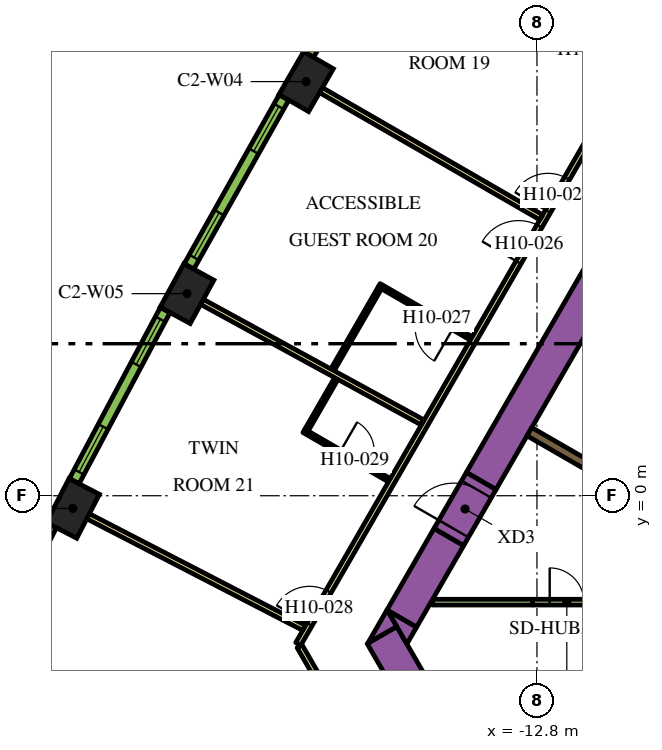
"""IFC4 building model, lengths in metres.
Left out: names, types, materials, properties, quantities, classifications, styles, units other than length and angle.
Written with IfcOpenShell. Run it as: python <this file> out.ifc"""

import sys

from ifc_helpers import new_model, si_unit, direction, frame, frame_2d, origin, origin_2d, place, context, subcontext, project, spatial, polyline, rectangle, outline, extrude, element, fill, save


model = new_model("IFC4")
c1 = context("Model", 3, precision=1e-05, world=origin(), true_north=direction((0.0, 1.0)))
c2 = subcontext(c1, "Body", "Model", "MODEL_VIEW")
j1 = project(units=[si_unit("LENGTHUNIT", "METRE"), si_unit("PLANEANGLEUNIT", "RADIAN")], contexts=[c1])
p1 = place(None, origin())
s1 = spatial("IfcSite", under=j1, at=p1, CompositionType="ELEMENT")
p2 = place(p1, origin())
s2 = spatial("IfcBuilding", under=s1, at=p2, CompositionType="ELEMENT")
p3 = place(p2, frame((0.0, 0.0, 130.5)))
s3 = spatial("IfcBuildingStorey", under=s2, at=p3, CompositionType="ELEMENT", Elevation=130.5)
for number, where, z_axis, x_axis in (
    (1, (-18.874, 10.897, 0.0), (0.0, 0.0, 1.0), (-0.5, -0.866, 0.0)),
    (2, (-22.009, 5.317, 0.0), (0.0, 0.0, 1.0), (-0.48, -0.877, 0.0)),
    (3, (-25.012, -0.334, 0.0), (0.0, 0.0, 1.0), (-0.459, -0.888, 0.0)),
):
    element("IfcColumn", number, at=place(p3, frame(where, z_axis=z_axis, x_axis=x_axis)), inside=s3, PredefinedType="COLUMN", context=c2, shape_type="SweptSolid", body=[
        extrude(rectangle(XDim=1.3, YDim=0.9, at=origin_2d()), origin(), (0.0, 0.0, 1.0), 3.9),
    ])
p4 = place(p3, frame((-14.268, 0.387, 0.0), z_axis=(0.0, 0.0, 1.0), x_axis=(0.499994617707, 0.866028511231, 0.0)))
e4 = element("IfcWall", 4, at=p4, inside=s3, PredefinedType="SOLIDWALL", context=c2, shape_type="SweptSolid", body=[
    extrude(rectangle(XDim=18.817, YDim=0.9, at=frame_2d((9.409, 0.0))), origin(), (0.0, 0.0, 1.0), 3.9),
])
p5 = place(p3, frame((-12.134, -11.883, 0.0), z_axis=(0.0, 0.0, 1.0), x_axis=(-0.500005339912, 0.866022320763, 0.0)))
e5 = element("IfcWall", 5, at=p5, inside=s3, PredefinedType="SOLIDWALL", context=c2, shape_type="SweptSolid", body=[
    extrude(rectangle(XDim=9.488, YDim=0.9, at=frame_2d((4.744, 0.0))), origin(), (0.0, 0.0, 1.0), 3.9),
])
p6 = place(p3, origin())
e6 = element("IfcWall", 6, at=p6, inside=s3, PredefinedType="SOLIDWALL", context=c2, shape_type="SweptSolid", body=[
    extrude(outline(polyline([(-16.489, -3.44), (-17.251, -3.88), (-16.743, -3.0), (-16.489, -3.44)])), origin(), (0.0, 0.0, 1.0), 3.9),
])
p7 = place(p3, frame((-15.118, -1.085, 0.0), z_axis=(0.0, 0.0, 1.0), x_axis=(-0.50006606081, -0.865987260198, 0.0)))
e7 = element("IfcWall", 7, at=p7, inside=s3, PredefinedType="SOLIDWALL", context=c2, shape_type="SweptSolid", body=[
    extrude(rectangle(XDim=2.481, YDim=0.9, at=frame_2d((1.24, 0.0))), origin(), (0.0, 0.0, 1.0), 3.9),
])
e8 = element("IfcWall", 8, at=p6, inside=s3, PredefinedType="SOLIDWALL", context=c2, shape_type="SweptSolid", body=[
    extrude(outline(polyline([(-16.223, -3.9), (-16.732, -3.02), (-15.969, -3.46), (-16.223, -3.9)])), origin(), (0.0, 0.0, 1.0), 3.9),
])
p8 = place(p3, frame((-14.44, -6.49, 0.0), z_axis=(0.0, 0.0, 1.0), x_axis=(0.866022966069, 0.500004222222, 0.0)))
e9 = element("IfcWall", 9, at=p8, inside=s3, PredefinedType="SOLIDWALL", context=c2, shape_type="SweptSolid", body=[
    extrude(rectangle(XDim=6.8, YDim=0.25, at=frame_2d((3.4, 0.0))), origin(), (0.0, 0.0, 1.0), 3.9),
])
p9 = place(p3, frame((-12.999, 1.685, 0.0), z_axis=(0.0, 0.0, 1.0), x_axis=(0.865996765544, -0.500049599607, 0.0)))
e10 = element("IfcWall", 10, at=p9, inside=s3, PredefinedType="SOLIDWALL", context=c2, shape_type="SweptSolid", body=[
    extrude(rectangle(XDim=2.498, YDim=0.25, at=frame_2d((1.249, 0.0))), origin(), (0.0, 0.0, 1.0), 3.9),
])
p10 = place(p3, frame((-12.915, -2.8, 0.0), z_axis=(0.0, 0.0, 1.0), x_axis=(-1.0, 0.0, 0.0)))
e11 = element("IfcWall", 11, at=p10, inside=s3, PredefinedType="PARTITIONING", context=c2, shape_type="SweptSolid", body=[
    extrude(rectangle(XDim=2.637, YDim=0.15, at=frame_2d((1.318, 0.0))), origin(), (0.0, 0.0, 1.0), 2.6),
])
p11 = place(p3, frame((-15.118, -1.085, 0.0), z_axis=(0.0, 0.0, 1.0), x_axis=(0.500000056704, 0.866025371046, 0.0)))
e12 = element("IfcWall", 12, at=p11, inside=s3, PredefinedType="SOLIDWALL", context=c2, shape_type="SweptSolid", body=[
    extrude(rectangle(XDim=1.7, YDim=0.9, at=frame_2d((0.85, 0.0))), origin(), (0.0, 0.0, 1.0), 3.9),
])
p12 = place(p11, frame((0.25, 0.0, 0.0)))
e13 = element("IfcOpeningElement", 13, at=p12, cuts=e12, PredefinedType="OPENING", context=c2, shape_type="SweptSolid", body=[
    extrude(rectangle(XDim=1.2, YDim=2.1, at=frame_2d((0.6, 1.05))), frame((0.0, 0.46, 0.0), z_axis=(0.0, -1.0, 0.0), x_axis=(1.0, 0.0, 0.0)), (0.0, 0.0, 1.0), 0.92),
])
p13 = place(p3, frame((-12.915, -2.8, 0.0), z_axis=(0.0, 0.0, 1.0), x_axis=(1.0, 0.0, 0.0)))
e14 = element("IfcWall", 14, at=p13, inside=s3, PredefinedType="PARTITIONING", context=c2, shape_type="SweptSolid", body=[
    extrude(rectangle(XDim=1.8, YDim=0.15, at=frame_2d((0.9, 0.0))), origin(), (0.0, 0.0, 1.0), 2.6),
])
p14 = place(p13, frame((0.45, 0.0, 0.0)))
e15 = element("IfcOpeningElement", 15, at=p14, cuts=e14, PredefinedType="OPENING", context=c2, shape_type="SweptSolid", body=[
    extrude(rectangle(XDim=0.9, YDim=2.1, at=frame_2d((0.45, 1.05))), frame((0.0, 0.085, 0.0), z_axis=(0.0, -1.0, 0.0), x_axis=(1.0, 0.0, 0.0)), (0.0, 0.0, 1.0), 0.17),
])
p15 = place(p3, frame((-19.081, -3.9, 0.0), z_axis=(0.0, 0.0, 1.0), x_axis=(0.499998313975, 0.866026377209, 0.0)))
e16 = element("IfcWall", 16, at=p15, inside=s3, PredefinedType="PARTITIONING", context=c2, shape_type="SweptSolid", body=[
    extrude(rectangle(XDim=25.766, YDim=0.15, at=frame_2d((12.883, 0.0))), origin(), (0.0, 0.0, 1.0), 2.6),
])
p16 = place(p15, frame((24.141, 0.0, 0.0)))
e17 = element("IfcOpeningElement", 17, at=p16, cuts=e16, PredefinedType="OPENING", context=c2, shape_type="SweptSolid", body=[
    extrude(rectangle(XDim=1.1, YDim=2.1, at=frame_2d((0.55, 1.05))), frame((0.0, 0.085, 0.0), z_axis=(0.0, -1.0, 0.0), x_axis=(1.0, 0.0, 0.0)), (0.0, 0.0, 1.0), 0.17),
])
p17 = place(p15, frame((13.144, 0.0, 0.0)))
e18 = element("IfcOpeningElement", 18, at=p17, cuts=e16, PredefinedType="OPENING", context=c2, shape_type="SweptSolid", body=[
    extrude(rectangle(XDim=1.0, YDim=2.1, at=frame_2d((0.5, 1.05))), frame((0.0, 0.085, 0.0), z_axis=(0.0, -1.0, 0.0), x_axis=(1.0, 0.0, 0.0)), (0.0, 0.0, 1.0), 0.17),
])
p18 = place(p15, frame((11.593, 0.0, 0.0)))
e19 = element("IfcOpeningElement", 19, at=p18, cuts=e16, PredefinedType="OPENING", context=c2, shape_type="SweptSolid", body=[
    extrude(rectangle(XDim=1.1, YDim=2.1, at=frame_2d((0.55, 1.05))), frame((0.0, 0.085, 0.0), z_axis=(0.0, -1.0, 0.0), x_axis=(1.0, 0.0, 0.0)), (0.0, 0.0, 1.0), 0.17),
])
p19 = place(p15, frame((0.596, 0.0, 0.0)))
e20 = element("IfcOpeningElement", 20, at=p19, cuts=e16, PredefinedType="OPENING", context=c2, shape_type="SweptSolid", body=[
    extrude(rectangle(XDim=1.0, YDim=2.1, at=frame_2d((0.5, 1.05))), frame((0.0, 0.085, 0.0), z_axis=(0.0, -1.0, 0.0), x_axis=(1.0, 0.0, 0.0)), (0.0, 0.0, 1.0), 0.17),
])
p20 = place(p3, frame((-16.412, -8.523, 0.0), z_axis=(0.0, 0.0, 1.0), x_axis=(-0.500001929737, 0.866024289647, 0.0)))
e21 = element("IfcWall", 21, at=p20, inside=s3, PredefinedType="PARTITIONING", context=c2, shape_type="SweptSolid", body=[
    extrude(rectangle(XDim=5.268, YDim=0.15, at=frame_2d((2.634, 0.0))), origin(), (0.0, 0.0, 1.0), 2.6),
])
p21 = place(p20, frame((2.157, 0.0, 0.0)))
e22 = element("IfcOpeningElement", 22, at=p21, cuts=e21, PredefinedType="OPENING", context=c2, shape_type="SweptSolid", body=[
    extrude(rectangle(XDim=1.0, YDim=2.1, at=frame_2d((0.5, 1.05))), frame((0.0, 0.085, 0.0), z_axis=(0.0, -1.0, 0.0), x_axis=(1.0, 0.0, 0.0)), (0.0, 0.0, 1.0), 0.17),
])
p22 = place(p3, frame((-24.613, -0.541, 0.0), z_axis=(0.0, 0.0, 1.0), x_axis=(0.888459912519, -0.458954228487, 0.0)))
e23 = element("IfcWall", 23, at=p22, inside=s3, PredefinedType="PARTITIONING", context=c2, shape_type="SweptSolid", body=[
    extrude(rectangle(XDim=6.392, YDim=0.15, at=frame_2d((3.196, 0.0))), origin(), (0.0, 0.0, 1.0), 2.6),
])
p23 = place(p3, frame((-21.614, 5.102, 0.0), z_axis=(0.0, 0.0, 1.0), x_axis=(0.877484555087, -0.479604895287, 0.0)))
e24 = element("IfcWall", 24, at=p23, inside=s3, PredefinedType="PARTITIONING", context=c2, shape_type="SweptSolid", body=[
    extrude(rectangle(XDim=6.611, YDim=0.15, at=frame_2d((3.306, 0.0))), origin(), (0.0, 0.0, 1.0), 2.6),
])
p24 = place(p3, frame((-18.484, 10.672, 0.0), z_axis=(0.0, 0.0, 1.0), x_axis=(0.866019162053, -0.50001081084, 0.0)))
e25 = element("IfcWall", 25, at=p24, inside=s3, PredefinedType="PARTITIONING", context=c2, shape_type="SweptSolid", body=[
    extrude(rectangle(XDim=6.694, YDim=0.15, at=frame_2d((3.347, 0.0))), origin(), (0.0, 0.0, 1.0), 2.6),
])
p25 = place(p3, frame((-12.698, 12.506, 0.0), z_axis=(0.0, 0.0, 1.0), x_axis=(0.865997922154, -0.500047596559, 0.0)))
e26 = element("IfcWall", 26, at=p25, inside=s3, PredefinedType="PARTITIONING", context=c2, shape_type="SweptSolid", body=[
    extrude(rectangle(XDim=2.6, YDim=0.1, at=frame_2d((1.3, 0.0))), origin(), (0.0, 0.0, 1.0), 2.6),
])
p26 = place(p25, frame((1.1, 0.0, 0.0)))
e27 = element("IfcOpeningElement", 27, at=p26, cuts=e26, PredefinedType="OPENING", context=c2, shape_type="SweptSolid", body=[
    extrude(rectangle(XDim=0.9, YDim=2.1, at=frame_2d((0.45, 1.05))), frame((0.0, 0.06, 0.0), z_axis=(0.0, -1.0, 0.0), x_axis=(1.0, 0.0, 0.0)), (0.0, 0.0, 1.0), 0.12),
])
p27 = place(p3, frame((-14.527, 4.138, 0.0), z_axis=(0.0, 0.0, 1.0), x_axis=(-0.866018616679, 0.500011755427, 0.0)))
e28 = element("IfcWall", 28, at=p27, inside=s3, PredefinedType="PARTITIONING", context=c2, shape_type="SweptSolid", body=[
    extrude(rectangle(XDim=2.8, YDim=0.1, at=frame_2d((1.4, 0.0))), origin(), (0.0, 0.0, 1.0), 2.6),
])
p28 = place(p27, frame((0.55, 0.0, 0.0)))
e29 = element("IfcOpeningElement", 29, at=p28, cuts=e28, PredefinedType="OPENING", context=c2, shape_type="SweptSolid", body=[
    extrude(rectangle(XDim=1.0, YDim=2.1, at=frame_2d((0.5, 1.05))), frame((0.0, 0.06, 0.0), z_axis=(0.0, -1.0, 0.0), x_axis=(1.0, 0.0, 0.0)), (0.0, 0.0, 1.0), 0.12),
])
p29 = place(p3, frame((-16.934, 5.469, 0.0), z_axis=(0.0, 0.0, 1.0), x_axis=(-0.499945955465, -0.866056604163, 0.0)))
e30 = element("IfcWall", 30, at=p29, inside=s3, PredefinedType="PARTITIONING", context=c2, shape_type="SweptSolid", body=[
    extrude(rectangle(XDim=2.49, YDim=0.1, at=frame_2d((1.245, 0.0))), origin(), (0.0, 0.0, 1.0), 2.6),
])
p30 = place(p3, frame((-18.933, 1.707, 0.0), z_axis=(0.0, 0.0, 1.0), x_axis=(0.866021400173, -0.500006934395, 0.0)))
e31 = element("IfcWall", 31, at=p30, inside=s3, PredefinedType="PARTITIONING", context=c2, shape_type="SweptSolid", body=[
    extrude(rectangle(XDim=2.6, YDim=0.1, at=frame_2d((1.3, 0.0))), origin(), (0.0, 0.0, 1.0), 2.6),
])
p31 = place(p30, frame((1.1, 0.0, 0.0)))
e32 = element("IfcOpeningElement", 32, at=p31, cuts=e31, PredefinedType="OPENING", context=c2, shape_type="SweptSolid", body=[
    extrude(rectangle(XDim=0.9, YDim=2.1, at=frame_2d((0.45, 1.05))), frame((0.0, 0.06, 0.0), z_axis=(0.0, -1.0, 0.0), x_axis=(1.0, 0.0, 0.0)), (0.0, 0.0, 1.0), 0.12),
])
p32 = place(p3, frame((-18.865, 1.725, 0.0), z_axis=(0.0, 0.0, 1.0), x_axis=(0.499993381564, 0.866029224906, 0.0)))
e33 = element("IfcWall", 33, at=p32, inside=s3, PredefinedType="PARTITIONING", context=c2, shape_type="SweptSolid", body=[
    extrude(rectangle(XDim=1.56, YDim=0.1, at=frame_2d((0.78, 0.0))), origin(), (0.0, 0.0, 1.0), 2.6),
])
p33 = place(p3, frame((-16.203, 15.998, 0.0), z_axis=(0.0, 0.0, 1.0), x_axis=(-0.510054281659, -0.860142214847, 0.0)))
e34 = element("IfcWall", 34, at=p33, inside=s3, PredefinedType="SOLIDWALL", context=c2, shape_type="SweptSolid", body=[
    extrude(rectangle(XDim=5.101, YDim=0.29, at=frame_2d((2.55, 0.0))), origin(), (0.0, 0.0, 1.0), 3.5),
])
p34 = place(p33, frame((0.273, 0.0, 0.9)))
e35 = element("IfcOpeningElement", 35, at=p34, cuts=e34, PredefinedType="OPENING", context=c2, shape_type="SweptSolid", body=[
    extrude(rectangle(XDim=1.35, YDim=2.15, at=frame_2d((0.675, 1.075))), frame((0.0, 0.155, 0.0), z_axis=(0.0, -1.0, 0.0), x_axis=(1.0, 0.0, 0.0)), (0.0, 0.0, 1.0), 0.31),
])
p35 = place(p33, frame((3.478, 0.0, 0.9)))
e36 = element("IfcOpeningElement", 36, at=p35, cuts=e34, PredefinedType="OPENING", context=c2, shape_type="SweptSolid", body=[
    extrude(rectangle(XDim=1.35, YDim=2.15, at=frame_2d((0.675, 1.075))), frame((0.0, 0.155, 0.0), z_axis=(0.0, -1.0, 0.0), x_axis=(1.0, 0.0, 0.0)), (0.0, 0.0, 1.0), 0.31),
])
p36 = place(p3, frame((-19.458, 10.48, 0.0), z_axis=(0.0, 0.0, 1.0), x_axis=(-0.48983164787, -0.87181704316, 0.0)))
e37 = element("IfcWall", 37, at=p36, inside=s3, PredefinedType="SOLIDWALL", context=c2, shape_type="SweptSolid", body=[
    extrude(rectangle(XDim=5.1, YDim=0.29, at=frame_2d((2.55, 0.0))), origin(), (0.0, 0.0, 1.0), 3.5),
])
p37 = place(p36, frame((0.272, 0.0, 0.9)))
e38 = element("IfcOpeningElement", 38, at=p37, cuts=e37, PredefinedType="OPENING", context=c2, shape_type="SweptSolid", body=[
    extrude(rectangle(XDim=1.35, YDim=2.15, at=frame_2d((0.675, 1.075))), frame((0.0, 0.155, 0.0), z_axis=(0.0, -1.0, 0.0), x_axis=(1.0, 0.0, 0.0)), (0.0, 0.0, 1.0), 0.31),
])
p38 = place(p36, frame((3.478, 0.0, 0.9)))
e39 = element("IfcOpeningElement", 39, at=p38, cuts=e37, PredefinedType="OPENING", context=c2, shape_type="SweptSolid", body=[
    extrude(rectangle(XDim=1.35, YDim=2.15, at=frame_2d((0.675, 1.075))), frame((0.0, 0.155, 0.0), z_axis=(0.0, -1.0, 0.0), x_axis=(1.0, 0.0, 0.0)), (0.0, 0.0, 1.0), 0.31),
])
p39 = place(p3, frame((-22.583, 4.887, 0.0), z_axis=(0.0, 0.0, 1.0), x_axis=(-0.469323203119, -0.883026461106, 0.0)))
e40 = element("IfcWall", 40, at=p39, inside=s3, PredefinedType="SOLIDWALL", context=c2, shape_type="SweptSolid", body=[
    extrude(rectangle(XDim=5.101, YDim=0.29, at=frame_2d((2.55, 0.0))), origin(), (0.0, 0.0, 1.0), 3.5),
])
p40 = place(p39, frame((0.273, 0.0, 0.9)))
e41 = element("IfcOpeningElement", 41, at=p40, cuts=e40, PredefinedType="OPENING", context=c2, shape_type="SweptSolid", body=[
    extrude(rectangle(XDim=1.35, YDim=2.15, at=frame_2d((0.675, 1.075))), frame((0.0, 0.155, 0.0), z_axis=(0.0, -1.0, 0.0), x_axis=(1.0, 0.0, 0.0)), (0.0, 0.0, 1.0), 0.31),
])
p41 = place(p39, frame((3.478, 0.0, 0.9)))
e42 = element("IfcOpeningElement", 42, at=p41, cuts=e40, PredefinedType="OPENING", context=c2, shape_type="SweptSolid", body=[
    extrude(rectangle(XDim=1.35, YDim=2.15, at=frame_2d((0.675, 1.075))), frame((0.0, 0.155, 0.0), z_axis=(0.0, -1.0, 0.0), x_axis=(1.0, 0.0, 0.0)), (0.0, 0.0, 1.0), 0.31),
])
p42 = place(p3, frame((-25.576, -0.778, 0.0), z_axis=(0.0, 0.0, 1.0), x_axis=(-0.448534297211, -0.893765620409, 0.0)))
e43 = element("IfcWall", 43, at=p42, inside=s3, PredefinedType="SOLIDWALL", context=c2, shape_type="SweptSolid", body=[
    extrude(rectangle(XDim=5.1, YDim=0.29, at=frame_2d((2.55, 0.0))), origin(), (0.0, 0.0, 1.0), 3.5),
])
p43 = place(p42, frame((0.272, 0.0, 0.9)))
e44 = element("IfcOpeningElement", 44, at=p43, cuts=e43, PredefinedType="OPENING", context=c2, shape_type="SweptSolid", body=[
    extrude(rectangle(XDim=1.35, YDim=2.15, at=frame_2d((0.675, 1.075))), frame((0.0, 0.155, 0.0), z_axis=(0.0, -1.0, 0.0), x_axis=(1.0, 0.0, 0.0)), (0.0, 0.0, 1.0), 0.31),
])
p44 = place(p42, frame((3.478, 0.0, 0.9)))
e45 = element("IfcOpeningElement", 45, at=p44, cuts=e43, PredefinedType="OPENING", context=c2, shape_type="SweptSolid", body=[
    extrude(rectangle(XDim=1.35, YDim=2.15, at=frame_2d((0.675, 1.075))), frame((0.0, 0.155, 0.0), z_axis=(0.0, -1.0, 0.0), x_axis=(1.0, 0.0, 0.0)), (0.0, 0.0, 1.0), 0.31),
])
p45 = place(p12, origin())
e46 = element("IfcDoor", 46, at=p45, inside=s3, OperationType="SINGLE_SWING_LEFT", PredefinedType="DOOR", context=c2, shape_type="SweptSolid", body=[
    extrude(rectangle(XDim=1.2, YDim=2.1, at=frame_2d((0.6, 1.05))), frame((0.0, 0.025, 0.0), z_axis=(0.0, -1.0, 0.0), x_axis=(1.0, 0.0, 0.0)), (0.0, 0.0, 1.0), 0.05),
])
fill(e13, e46)
p46 = place(p14, origin())
e47 = element("IfcDoor", 47, at=p46, inside=s3, OperationType="SINGLE_SWING_LEFT", PredefinedType="DOOR", context=c2, shape_type="SweptSolid", body=[
    extrude(rectangle(XDim=0.9, YDim=2.1, at=frame_2d((0.45, 1.05))), frame((0.0, 0.025, 0.0), z_axis=(0.0, -1.0, 0.0), x_axis=(1.0, 0.0, 0.0)), (0.0, 0.0, 1.0), 0.05),
])
fill(e15, e47)
p47 = place(p17, origin())
e48 = element("IfcDoor", 48, at=p47, inside=s3, OperationType="SINGLE_SWING_LEFT", PredefinedType="DOOR", context=c2, shape_type="SweptSolid", body=[
    extrude(rectangle(XDim=1.0, YDim=2.1, at=frame_2d((0.5, 1.05))), frame((0.0, 0.025, 0.0), z_axis=(0.0, -1.0, 0.0), x_axis=(1.0, 0.0, 0.0)), (0.0, 0.0, 1.0), 0.05),
])
fill(e18, e48)
p48 = place(p26, origin())
e49 = element("IfcDoor", 49, at=p48, inside=s3, OperationType="SINGLE_SWING_LEFT", PredefinedType="DOOR", context=c2, shape_type="SweptSolid", body=[
    extrude(rectangle(XDim=0.9, YDim=2.1, at=frame_2d((0.45, 1.05))), frame((0.0, 0.025, 0.0), z_axis=(0.0, -1.0, 0.0), x_axis=(1.0, 0.0, 0.0)), (0.0, 0.0, 1.0), 0.05),
])
fill(e27, e49)
p49 = place(p18, origin())
e50 = element("IfcDoor", 50, at=p49, inside=s3, OperationType="SINGLE_SWING_RIGHT", PredefinedType="DOOR", context=c2, shape_type="SweptSolid", body=[
    extrude(rectangle(XDim=1.1, YDim=2.1, at=frame_2d((0.55, 1.05))), frame((0.0, 0.025, 0.0), z_axis=(0.0, -1.0, 0.0), x_axis=(1.0, 0.0, 0.0)), (0.0, 0.0, 1.0), 0.05),
])
fill(e19, e50)
p50 = place(p28, origin())
e51 = element("IfcDoor", 51, at=p50, inside=s3, OperationType="SINGLE_SWING_LEFT", PredefinedType="DOOR", context=c2, shape_type="SweptSolid", body=[
    extrude(rectangle(XDim=1.0, YDim=2.1, at=frame_2d((0.5, 1.05))), frame((0.0, 0.025, 0.0), z_axis=(0.0, -1.0, 0.0), x_axis=(1.0, 0.0, 0.0)), (0.0, 0.0, 1.0), 0.05),
])
fill(e29, e51)
p51 = place(p19, origin())
e52 = element("IfcDoor", 52, at=p51, inside=s3, OperationType="SINGLE_SWING_LEFT", PredefinedType="DOOR", context=c2, shape_type="SweptSolid", body=[
    extrude(rectangle(XDim=1.0, YDim=2.1, at=frame_2d((0.5, 1.05))), frame((0.0, 0.025, 0.0), z_axis=(0.0, -1.0, 0.0), x_axis=(1.0, 0.0, 0.0)), (0.0, 0.0, 1.0), 0.05),
])
fill(e20, e52)
p52 = place(p31, origin())
e53 = element("IfcDoor", 53, at=p52, inside=s3, OperationType="SINGLE_SWING_RIGHT", PredefinedType="DOOR", context=c2, shape_type="SweptSolid", body=[
    extrude(rectangle(XDim=0.9, YDim=2.1, at=frame_2d((0.45, 1.05))), frame((0.0, 0.025, 0.0), z_axis=(0.0, -1.0, 0.0), x_axis=(1.0, 0.0, 0.0)), (0.0, 0.0, 1.0), 0.05),
])
fill(e32, e53)
p53 = place(p37, origin())
e54 = element("IfcWindow", 54, at=p53, inside=s3, PartitioningType="DOUBLE_PANEL_VERTICAL", PredefinedType="WINDOW", context=c2, shape_type="SweptSolid", body=[
    extrude(rectangle(XDim=1.35, YDim=2.15, at=frame_2d((0.675, 1.075))), frame((0.0, 0.015, 0.0), z_axis=(0.0, -1.0, 0.0), x_axis=(1.0, 0.0, 0.0)), (0.0, 0.0, 1.0), 0.06),
])
fill(e38, e54)
p54 = place(p38, origin())
e55 = element("IfcWindow", 55, at=p54, inside=s3, PartitioningType="DOUBLE_PANEL_VERTICAL", PredefinedType="WINDOW", context=c2, shape_type="SweptSolid", body=[
    extrude(rectangle(XDim=1.35, YDim=2.15, at=frame_2d((0.675, 1.075))), frame((0.0, 0.015, 0.0), z_axis=(0.0, -1.0, 0.0), x_axis=(1.0, 0.0, 0.0)), (0.0, 0.0, 1.0), 0.06),
])
fill(e39, e55)
p55 = place(p40, origin())
e56 = element("IfcWindow", 56, at=p55, inside=s3, PartitioningType="DOUBLE_PANEL_VERTICAL", PredefinedType="WINDOW", context=c2, shape_type="SweptSolid", body=[
    extrude(rectangle(XDim=1.35, YDim=2.15, at=frame_2d((0.675, 1.075))), frame((0.0, 0.015, 0.0), z_axis=(0.0, -1.0, 0.0), x_axis=(1.0, 0.0, 0.0)), (0.0, 0.0, 1.0), 0.06),
])
fill(e41, e56)
p56 = place(p41, origin())
e57 = element("IfcWindow", 57, at=p56, inside=s3, PartitioningType="DOUBLE_PANEL_VERTICAL", PredefinedType="WINDOW", context=c2, shape_type="SweptSolid", body=[
    extrude(rectangle(XDim=1.35, YDim=2.15, at=frame_2d((0.675, 1.075))), frame((0.0, 0.015, 0.0), z_axis=(0.0, -1.0, 0.0), x_axis=(1.0, 0.0, 0.0)), (0.0, 0.0, 1.0), 0.06),
])
fill(e42, e57)
save(model, sys.argv[1])
